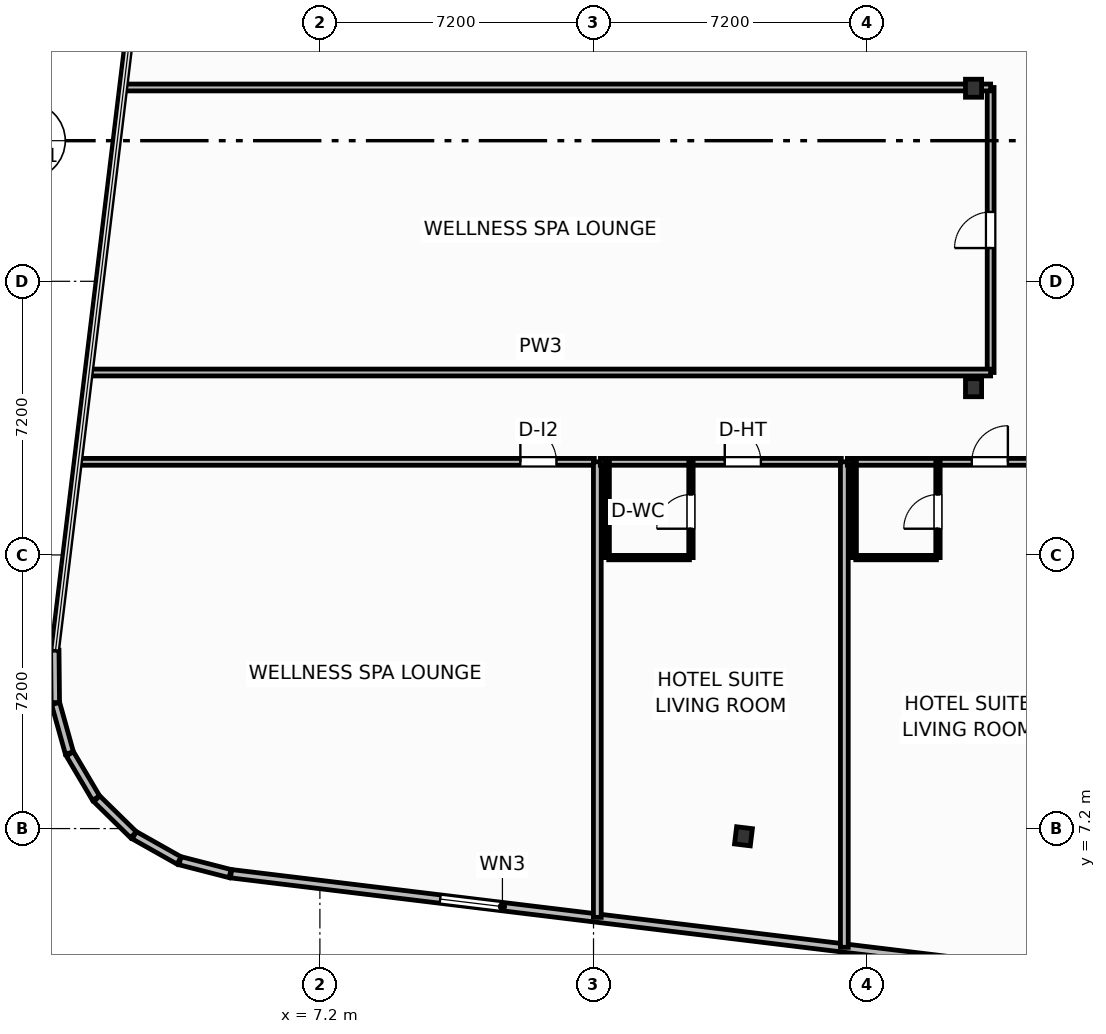
"""IFC4 building model, lengths in metres.
Left out: names, types, materials, properties, quantities, classifications, styles, units other than length and angle.
Written with IfcOpenShell. Run it as: python <this file> out.ifc"""

import sys

from ifc_helpers import new_model, si_unit, direction, frame, frame_2d, origin, origin_2d, place, context, subcontext, project, spatial, rectangle, i_section, extrude, element, fill, save


model = new_model("IFC4")
c1 = context("Model", 3, precision=1e-05, world=origin(), true_north=direction((0.0, 1.0)))
c2 = subcontext(c1, "Body", "Model", "MODEL_VIEW")
j1 = project(units=[si_unit("LENGTHUNIT", "METRE"), si_unit("PLANEANGLEUNIT", "RADIAN")], contexts=[c1])
p1 = place(None, origin())
s1 = spatial("IfcSite", under=j1, at=p1, CompositionType="ELEMENT")
p2 = place(p1, origin())
s2 = spatial("IfcBuilding", under=s1, at=p2, CompositionType="ELEMENT")
p3 = place(p2, frame((0.0, 0.0, 129.1)))
s3 = spatial("IfcBuildingStorey", under=s2, at=p3, CompositionType="ELEMENT", Elevation=129.1)
for number, where, z_axis, x_axis in (
    (1, (24.4, 18.8, 0.0), (0.0, 0.0, 1.0), (1.0, 0.0, 0.0)),
    (2, (24.4, 26.68, 0.0), (0.0, 0.0, 1.0), (1.0, 0.0, 0.0)),
):
    element("IfcColumn", number, at=place(p3, frame(where, z_axis=z_axis, x_axis=x_axis)), inside=s3, PredefinedType="COLUMN", context=c2, shape_type="SweptSolid", body=[
        extrude(i_section(OverallWidth=0.424, OverallDepth=0.474, WebThickness=0.048, FlangeThickness=0.077, FilletRadius=0.025, at=origin_2d()), origin(), (0.0, 0.0, 1.0), 3.7),
    ])
p4 = place(p3, frame((18.346, 6.997, 0.0), z_axis=(0.0, 0.0, 1.0), x_axis=(0.992732158755, -0.12034475881, 0.0)))
e3 = element("IfcColumn", 3, at=p4, inside=s3, PredefinedType="COLUMN", context=c2, shape_type="SweptSolid", body=[
    extrude(i_section(OverallWidth=0.418, OverallDepth=0.455, WebThickness=0.042, FlangeThickness=0.068, FilletRadius=0.025, at=origin_2d()), origin(), (0.0, 0.0, 1.0), 3.7),
])
p5 = place(p3, frame((0.224, 11.893, 0.0), z_axis=(0.0, 0.0, 1.0), x_axis=(0.010098705419, -0.999949006774, 0.0)))
e4 = element("IfcWall", 4, at=p5, inside=s3, PredefinedType="SOLIDWALL", context=c2, shape_type="SweptSolid", body=[
    extrude(rectangle(XDim=1.378, YDim=0.22, at=frame_2d((0.689, 0.0))), origin(), (0.0, 0.0, 1.0), 2.73),
])
p6 = place(p3, frame((0.245, 10.491, 0.0), z_axis=(0.0, 0.0, 1.0), x_axis=(0.268853470153, -0.963181089716, 0.0)))
e5 = element("IfcWall", 5, at=p6, inside=s3, PredefinedType="SOLIDWALL", context=c2, shape_type="SweptSolid", body=[
    extrude(rectangle(XDim=1.353, YDim=0.22, at=frame_2d((0.677, 0.0))), origin(), (0.0, 0.0, 1.0), 2.73),
])
p7 = place(p3, frame((0.622, 9.166, 0.0), z_axis=(0.0, 0.0, 1.0), x_axis=(0.508911700393, -0.860818727261, 0.0)))
e6 = element("IfcWall", 6, at=p7, inside=s3, PredefinedType="SOLIDWALL", context=c2, shape_type="SweptSolid", body=[
    extrude(rectangle(XDim=1.353, YDim=0.22, at=frame_2d((0.676, 0.0))), origin(), (0.0, 0.0, 1.0), 2.73),
])
p8 = place(p3, frame((1.328, 7.984, 0.0), z_axis=(0.0, 0.0, 1.0), x_axis=(0.714376989847, -0.69976104234, 0.0)))
e7 = element("IfcWall", 7, at=p8, inside=s3, PredefinedType="SOLIDWALL", context=c2, shape_type="SweptSolid", body=[
    extrude(rectangle(XDim=1.353, YDim=0.22, at=frame_2d((0.677, 0.0))), origin(), (0.0, 0.0, 1.0), 2.73),
])
p9 = place(p3, frame((2.316, 7.025, 0.0), z_axis=(0.0, 0.0, 1.0), x_axis=(0.87113677592, -0.491040443996, 0.0)))
e8 = element("IfcWall", 8, at=p9, inside=s3, PredefinedType="SOLIDWALL", context=c2, shape_type="SweptSolid", body=[
    extrude(rectangle(XDim=1.353, YDim=0.22, at=frame_2d((0.677, 0.0))), origin(), (0.0, 0.0, 1.0), 2.73),
])
p10 = place(p3, frame((3.519, 6.354, 0.0), z_axis=(0.0, 0.0, 1.0), x_axis=(0.968506529347, -0.248988157573, 0.0)))
e9 = element("IfcWall", 9, at=p10, inside=s3, PredefinedType="SOLIDWALL", context=c2, shape_type="SweptSolid", body=[
    extrude(rectangle(XDim=1.361, YDim=0.22, at=frame_2d((0.681, 0.0))), origin(), (0.0, 0.0, 1.0), 2.73),
])
p11 = place(p3, frame((4.862, 6.012, 0.0), z_axis=(0.0, 0.0, 1.0), x_axis=(0.99273213367, -0.120344965739, 0.0)))
e10 = element("IfcWall", 10, at=p11, inside=s3, PredefinedType="SOLIDWALL", context=c2, shape_type="SweptSolid", body=[
    extrude(rectangle(XDim=21.447, YDim=0.22, at=frame_2d((10.724, 0.0))), origin(), (0.0, 0.0, 1.0), 2.73),
])
p12 = place(p11, frame((5.543, 0.0, 0.8)))
e11 = element("IfcOpeningElement", 11, at=p12, cuts=e10, PredefinedType="OPENING", context=c2, shape_type="SweptSolid", body=[
    extrude(rectangle(XDim=1.65, YDim=1.65, at=frame_2d((0.825, 0.825))), frame((0.0, 0.12, 0.0), z_axis=(0.0, -1.0, 0.0), x_axis=(1.0, 0.0, 0.0)), (0.0, 0.0, 1.0), 0.24),
])
p13 = place(p3, frame((0.884, 16.85, 0.0), z_axis=(0.0, 0.0, 1.0), x_axis=(1.0, 0.0, 0.0)))
e12 = element("IfcWall", 12, at=p13, inside=s3, PredefinedType="PARTITIONING", context=c2, shape_type="SweptSolid", body=[
    extrude(rectangle(XDim=13.536, YDim=0.18, at=frame_2d((6.768, 0.0))), origin(), (0.0, 0.0, 1.0), 3.45),
])
p14 = place(p13, frame((11.591, 0.0, 0.0)))
e13 = element("IfcOpeningElement", 13, at=p14, cuts=e12, PredefinedType="OPENING", context=c2, shape_type="SweptSolid", body=[
    extrude(rectangle(XDim=0.95, YDim=2.05, at=frame_2d((0.475, 1.025))), frame((0.0, 0.1, 0.0), z_axis=(0.0, -1.0, 0.0), x_axis=(1.0, 0.0, 0.0)), (0.0, 0.0, 1.0), 0.2),
])
p15 = place(p3, frame((14.5, 4.864, 0.0), z_axis=(0.0, 0.0, 1.0), x_axis=(0.0, 1.0, 0.0)))
e14 = element("IfcWall", 14, at=p15, inside=s3, PredefinedType="PARTITIONING", context=c2, shape_type="SweptSolid", body=[
    extrude(rectangle(XDim=11.986, YDim=0.205, at=frame_2d((5.993, 0.0))), origin(), (0.0, 0.0, 1.0), 3.45),
])
p16 = place(p3, frame((14.58, 16.85, 0.0), z_axis=(0.0, 0.0, 1.0), x_axis=(1.0, 0.0, 0.0)))
e15 = element("IfcWall", 15, at=p16, inside=s3, PredefinedType="PARTITIONING", context=c2, shape_type="SweptSolid", body=[
    extrude(rectangle(XDim=6.34, YDim=0.18, at=frame_2d((3.17, 0.0))), origin(), (0.0, 0.0, 1.0), 3.45),
])
p17 = place(p16, frame((3.274, 0.0, 0.0)))
e16 = element("IfcOpeningElement", 16, at=p17, cuts=e15, PredefinedType="OPENING", context=c2, shape_type="SweptSolid", body=[
    extrude(rectangle(XDim=0.95, YDim=2.15, at=frame_2d((0.475, 1.075))), frame((0.0, 0.1, 0.0), z_axis=(0.0, -1.0, 0.0), x_axis=(1.0, 0.0, 0.0)), (0.0, 0.0, 1.0), 0.2),
])
p18 = place(p3, frame((14.8, 14.33, 0.0), z_axis=(0.0, 0.0, 1.0), x_axis=(1.0, 0.0, 0.0)))
e17 = element("IfcWall", 17, at=p18, inside=s3, PredefinedType="PARTITIONING", context=c2, shape_type="SweptSolid", body=[
    extrude(rectangle(XDim=2.124, YDim=0.115, at=frame_2d((1.062, 0.0))), origin(), (0.0, 0.0, 1.0), 3.45),
])
p19 = place(p3, frame((16.964, 14.33, 0.0), z_axis=(0.0, 0.0, 1.0), x_axis=(0.0, 1.0, 0.0)))
e18 = element("IfcWall", 18, at=p19, inside=s3, PredefinedType="PARTITIONING", context=c2, shape_type="SweptSolid", body=[
    extrude(rectangle(XDim=2.52, YDim=0.115, at=frame_2d((1.26, 0.0))), origin(), (0.0, 0.0, 1.0), 3.45),
])
p20 = place(p19, frame((0.76, 0.0, 0.0)))
e19 = element("IfcOpeningElement", 19, at=p20, cuts=e18, PredefinedType="OPENING", context=c2, shape_type="SweptSolid", body=[
    extrude(rectangle(XDim=0.9, YDim=2.05, at=frame_2d((0.45, 1.025))), frame((0.0, 0.067, 0.0), z_axis=(0.0, -1.0, 0.0), x_axis=(1.0, 0.0, 0.0)), (0.0, 0.0, 1.0), 0.135),
])
p21 = place(p3, frame((14.76, 14.33, 0.0), z_axis=(0.0, 0.0, 1.0), x_axis=(0.0, 1.0, 0.0)))
e20 = element("IfcWall", 20, at=p21, inside=s3, PredefinedType="PARTITIONING", context=c2, shape_type="SweptSolid", body=[
    extrude(rectangle(XDim=2.52, YDim=0.115, at=frame_2d((1.26, 0.0))), origin(), (0.0, 0.0, 1.0), 3.45),
])
p22 = place(p3, frame((21.0, 4.076, 0.0), z_axis=(0.0, 0.0, 1.0), x_axis=(0.0, 1.0, 0.0)))
e21 = element("IfcWall", 21, at=p22, inside=s3, PredefinedType="PARTITIONING", context=c2, shape_type="SweptSolid", body=[
    extrude(rectangle(XDim=12.774, YDim=0.205, at=frame_2d((6.387, 0.0))), origin(), (0.0, 0.0, 1.0), 3.45),
])
p23 = place(p3, frame((21.08, 16.85, 0.0), z_axis=(0.0, 0.0, 1.0), x_axis=(1.0, 0.0, 0.0)))
e22 = element("IfcWall", 22, at=p23, inside=s3, PredefinedType="PARTITIONING", context=c2, shape_type="SweptSolid", body=[
    extrude(rectangle(XDim=6.34, YDim=0.18, at=frame_2d((3.17, 0.0))), origin(), (0.0, 0.0, 1.0), 3.45),
])
p24 = place(p23, frame((3.274, 0.0, 0.0)))
e23 = element("IfcOpeningElement", 23, at=p24, cuts=e22, PredefinedType="OPENING", context=c2, shape_type="SweptSolid", body=[
    extrude(rectangle(XDim=0.95, YDim=2.15, at=frame_2d((0.475, 1.075))), frame((0.0, 0.1, 0.0), z_axis=(0.0, -1.0, 0.0), x_axis=(1.0, 0.0, 0.0)), (0.0, 0.0, 1.0), 0.2),
])
p25 = place(p3, frame((21.3, 14.33, 0.0), z_axis=(0.0, 0.0, 1.0), x_axis=(1.0, 0.0, 0.0)))
e24 = element("IfcWall", 24, at=p25, inside=s3, PredefinedType="PARTITIONING", context=c2, shape_type="SweptSolid", body=[
    extrude(rectangle(XDim=2.124, YDim=0.115, at=frame_2d((1.062, 0.0))), origin(), (0.0, 0.0, 1.0), 3.45),
])
p26 = place(p3, frame((23.464, 14.33, 0.0), z_axis=(0.0, 0.0, 1.0), x_axis=(0.0, 1.0, 0.0)))
e25 = element("IfcWall", 25, at=p26, inside=s3, PredefinedType="PARTITIONING", context=c2, shape_type="SweptSolid", body=[
    extrude(rectangle(XDim=2.52, YDim=0.115, at=frame_2d((1.26, 0.0))), origin(), (0.0, 0.0, 1.0), 3.45),
])
p27 = place(p26, frame((0.76, 0.0, 0.0)))
e26 = element("IfcOpeningElement", 26, at=p27, cuts=e25, PredefinedType="OPENING", context=c2, shape_type="SweptSolid", body=[
    extrude(rectangle(XDim=0.9, YDim=2.05, at=frame_2d((0.45, 1.025))), frame((0.0, 0.067, 0.0), z_axis=(0.0, -1.0, 0.0), x_axis=(1.0, 0.0, 0.0)), (0.0, 0.0, 1.0), 0.135),
])
p28 = place(p3, frame((21.26, 14.33, 0.0), z_axis=(0.0, 0.0, 1.0), x_axis=(0.0, 1.0, 0.0)))
e27 = element("IfcWall", 27, at=p28, inside=s3, PredefinedType="PARTITIONING", context=c2, shape_type="SweptSolid", body=[
    extrude(rectangle(XDim=2.52, YDim=0.115, at=frame_2d((1.26, 0.0))), origin(), (0.0, 0.0, 1.0), 3.45),
])
p29 = place(p3, frame((24.85, 19.2, 0.0), z_axis=(0.0, 0.0, 1.0), x_axis=(0.0, 1.0, 0.0)))
e28 = element("IfcWall", 28, at=p29, inside=s3, PredefinedType="PARTITIONING", context=c2, shape_type="SweptSolid", body=[
    extrude(rectangle(XDim=7.5, YDim=0.18, at=frame_2d((3.75, 0.0))), origin(), (0.0, 0.0, 1.0), 3.45),
])
p30 = place(p29, frame((3.275, 0.0, 0.0)))
e29 = element("IfcOpeningElement", 29, at=p30, cuts=e28, PredefinedType="OPENING", context=c2, shape_type="SweptSolid", body=[
    extrude(rectangle(XDim=0.95, YDim=2.05, at=frame_2d((0.475, 1.025))), frame((0.0, 0.1, 0.0), z_axis=(0.0, -1.0, 0.0), x_axis=(1.0, 0.0, 0.0)), (0.0, 0.0, 1.0), 0.2),
])
p31 = place(p3, frame((1.169, 19.2, 0.0), z_axis=(0.0, 0.0, 1.0), x_axis=(1.0, 0.0, 0.0)))
e30 = element("IfcWall", 30, at=p31, inside=s3, PredefinedType="PARTITIONING", context=c2, shape_type="SweptSolid", body=[
    extrude(rectangle(XDim=23.681, YDim=0.18, at=frame_2d((11.84, 0.0))), origin(), (0.0, 0.0, 1.0), 3.45),
])
p32 = place(p3, frame((2.078, 26.7, 0.0), z_axis=(0.0, 0.0, 1.0), x_axis=(1.0, 0.0, 0.0)))
e31 = element("IfcWall", 31, at=p32, inside=s3, PredefinedType="PARTITIONING", context=c2, shape_type="SweptSolid", body=[
    extrude(rectangle(XDim=22.772, YDim=0.18, at=frame_2d((11.386, 0.0))), origin(), (0.0, 0.0, 1.0), 2.662),
])
p33 = place(p12, origin())
e32 = element("IfcWindow", 32, at=p33, inside=s3, PartitioningType="SINGLE_PANEL", PredefinedType="WINDOW", context=c2, shape_type="SweptSolid", body=[
    extrude(rectangle(XDim=1.65, YDim=1.65, at=frame_2d((0.825, 0.825))), frame((0.0, 0.03, 0.0), z_axis=(0.0, -1.0, 0.0), x_axis=(1.0, 0.0, 0.0)), (0.0, 0.0, 1.0), 0.06),
])
fill(e11, e32)
p34 = place(p14, origin())
e33 = element("IfcDoor", 33, at=p34, inside=s3, OperationType="SINGLE_SWING_LEFT", PredefinedType="DOOR", context=c2, shape_type="SweptSolid", body=[
    extrude(rectangle(XDim=0.95, YDim=2.05, at=frame_2d((0.475, 1.025))), frame((0.0, 0.025, 0.0), z_axis=(0.0, -1.0, 0.0), x_axis=(1.0, 0.0, 0.0)), (0.0, 0.0, 1.0), 0.05),
])
fill(e13, e33)
p35 = place(p17, origin())
e34 = element("IfcDoor", 34, at=p35, inside=s3, OperationType="SINGLE_SWING_LEFT", PredefinedType="DOOR", context=c2, shape_type="SweptSolid", body=[
    extrude(rectangle(XDim=0.95, YDim=2.15, at=frame_2d((0.475, 1.075))), frame((0.0, 0.025, 0.0), z_axis=(0.0, -1.0, 0.0), x_axis=(1.0, 0.0, 0.0)), (0.0, 0.0, 1.0), 0.05),
])
fill(e16, e34)
p36 = place(p20, origin())
e35 = element("IfcDoor", 35, at=p36, inside=s3, OperationType="SINGLE_SWING_LEFT", PredefinedType="DOOR", context=c2, shape_type="SweptSolid", body=[
    extrude(rectangle(XDim=0.9, YDim=2.05, at=frame_2d((0.45, 1.025))), frame((0.0, 0.025, 0.0), z_axis=(0.0, -1.0, 0.0), x_axis=(1.0, 0.0, 0.0)), (0.0, 0.0, 1.0), 0.05),
])
fill(e19, e35)
p37 = place(p24, origin())
e36 = element("IfcDoor", 36, at=p37, inside=s3, OperationType="SINGLE_SWING_RIGHT", PredefinedType="DOOR", context=c2, shape_type="SweptSolid", body=[
    extrude(rectangle(XDim=0.95, YDim=2.15, at=frame_2d((0.475, 1.075))), frame((0.0, 0.025, 0.0), z_axis=(0.0, -1.0, 0.0), x_axis=(1.0, 0.0, 0.0)), (0.0, 0.0, 1.0), 0.05),
])
fill(e23, e36)
p38 = place(p27, origin())
e37 = element("IfcDoor", 37, at=p38, inside=s3, OperationType="SINGLE_SWING_LEFT", PredefinedType="DOOR", context=c2, shape_type="SweptSolid", body=[
    extrude(rectangle(XDim=0.9, YDim=2.05, at=frame_2d((0.45, 1.025))), frame((0.0, 0.025, 0.0), z_axis=(0.0, -1.0, 0.0), x_axis=(1.0, 0.0, 0.0)), (0.0, 0.0, 1.0), 0.05),
])
fill(e26, e37)
p39 = place(p30, origin())
e38 = element("IfcDoor", 38, at=p39, inside=s3, OperationType="SINGLE_SWING_LEFT", PredefinedType="DOOR", context=c2, shape_type="SweptSolid", body=[
    extrude(rectangle(XDim=0.95, YDim=2.05, at=frame_2d((0.475, 1.025))), frame((0.0, 0.025, 0.0), z_axis=(0.0, -1.0, 0.0), x_axis=(1.0, 0.0, 0.0)), (0.0, 0.0, 1.0), 0.05),
])
fill(e29, e38)
save(model, sys.argv[1])
